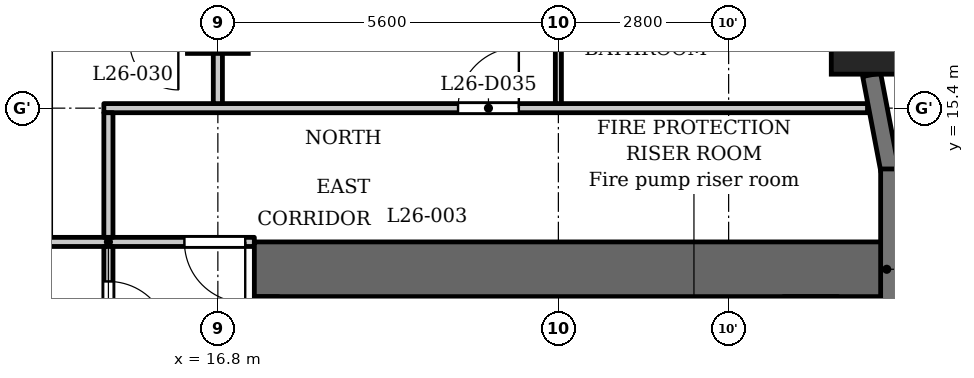
"""IFC4 building model, lengths in metres.
Left out: names, types, materials, properties, quantities, classifications, styles, units other than length and angle.
Written with IfcOpenShell. Run it as: python <this file> out.ifc"""

import sys

from ifc_helpers import new_model, si_unit, direction, frame, frame_2d, origin, origin_2d, place, context, subcontext, project, spatial, rectangle, extrude, element, fill, save


model = new_model("IFC4")
c1 = context("Model", 3, precision=1e-05, world=origin(), true_north=direction((0.0, 1.0)))
c2 = subcontext(c1, "Body", "Model", "MODEL_VIEW")
j1 = project(units=[si_unit("LENGTHUNIT", "METRE"), si_unit("PLANEANGLEUNIT", "RADIAN")], contexts=[c1])
p1 = place(None, origin())
s1 = spatial("IfcSite", under=j1, at=p1, CompositionType="ELEMENT")
p2 = place(p1, origin())
s2 = spatial("IfcBuilding", under=s1, at=p2, CompositionType="ELEMENT")
p3 = place(p2, frame((0.0, 0.0, 104.3)))
s3 = spatial("IfcBuildingStorey", under=s2, at=p3, CompositionType="ELEMENT", Elevation=104.3)
p4 = place(p3, frame((27.538, 16.609, 0.0), z_axis=(0.0, 0.0, 1.0), x_axis=(1.0, 0.0, 0.0)))
e1 = element("IfcColumn", 1, at=p4, inside=s3, PredefinedType="COLUMN", context=c2, shape_type="SweptSolid", body=[
    extrude(rectangle(XDim=1.3, YDim=1.3, at=origin_2d()), origin(), (0.0, 0.0, 1.0), 3.5),
])
p5 = place(p3, frame((16.8, 16.8, 0.0), z_axis=(0.0, 0.0, 1.0), x_axis=(1.0, 0.0, 0.0)))
e2 = element("IfcColumn", 2, at=p5, inside=s3, PredefinedType="COLUMN", context=c2, shape_type="SweptSolid", body=[
    extrude(rectangle(XDim=1.0, YDim=1.0, at=origin_2d()), origin(), (0.0, 0.0, 1.0), 3.5),
])
p6 = place(p3, frame((27.85, 11.85, 0.0), z_axis=(0.0, 0.0, 1.0), x_axis=(0.0, 1.0, 0.0)))
e3 = element("IfcWall", 3, at=p6, inside=s3, PredefinedType="SOLIDWALL", context=c2, shape_type="SweptSolid", body=[
    extrude(rectangle(XDim=2.55, YDim=0.3, at=frame_2d((1.275, 0.0))), origin(), (0.0, 0.0, 1.0), 2.4),
])
p7 = place(p3, frame((27.853, 14.372, 0.0), z_axis=(0.0, 0.0, 1.0), x_axis=(-0.187279751651, 0.982306619453, 0.0)))
e4 = element("IfcWall", 4, at=p7, inside=s3, PredefinedType="SOLIDWALL", context=c2, shape_type="SweptSolid", body=[
    extrude(rectangle(XDim=1.606, YDim=0.3, at=frame_2d((0.803, 0.0))), origin(), (0.0, 0.0, 1.0), 2.4),
])
p8 = place(p3, frame((17.4, 12.75, 0.0), z_axis=(0.0, 0.0, 1.0), x_axis=(1.0, 0.0, 0.0)))
e5 = element("IfcWall", 5, at=p8, inside=s3, PredefinedType="SHEAR", context=c2, shape_type="SweptSolid", body=[
    extrude(rectangle(XDim=10.4, YDim=0.9, at=frame_2d((5.2, 0.0))), origin(), (0.0, 0.0, 1.0), 3.2),
])
p9 = place(p3, frame((17.6, -12.3, 0.0), z_axis=(0.0, 0.0, 1.0), x_axis=(0.0, 1.0, 0.0)))
e6 = element("IfcWall", 6, at=p9, inside=s3, PredefinedType="SHEAR", context=c2, shape_type="SweptSolid", body=[
    extrude(rectangle(XDim=24.6, YDim=0.4, at=frame_2d((12.3, 0.0))), origin(), (0.0, 0.0, 1.0), 3.2),
])
p10 = place(p9, frame((6.0, 0.0, 0.0)))
e7 = element("IfcOpeningElement", 7, at=p10, cuts=e6, PredefinedType="OPENING", context=c2, shape_type="SweptSolid", body=[
    extrude(rectangle(XDim=1.1, YDim=2.1, at=frame_2d((0.55, 1.05))), frame((0.0, 0.21, 0.0), z_axis=(0.0, -1.0, 0.0), x_axis=(1.0, 0.0, 0.0)), (0.0, 0.0, 1.0), 0.42),
])
p11 = place(p9, frame((8.4, 0.0, 0.0)))
e8 = element("IfcOpeningElement", 8, at=p11, cuts=e6, PredefinedType="OPENING", context=c2, shape_type="SweptSolid", body=[
    extrude(rectangle(XDim=1.1, YDim=2.1, at=frame_2d((0.55, 1.05))), frame((0.0, 0.21, 0.0), z_axis=(0.0, -1.0, 0.0), x_axis=(1.0, 0.0, 0.0)), (0.0, 0.0, 1.0), 0.42),
])
p12 = place(p9, frame((10.8, 0.0, 0.0)))
e9 = element("IfcOpeningElement", 9, at=p12, cuts=e6, PredefinedType="OPENING", context=c2, shape_type="SweptSolid", body=[
    extrude(rectangle(XDim=1.1, YDim=2.1, at=frame_2d((0.55, 1.05))), frame((0.0, 0.21, 0.0), z_axis=(0.0, -1.0, 0.0), x_axis=(1.0, 0.0, 0.0)), (0.0, 0.0, 1.0), 0.42),
])
p13 = place(p9, frame((16.75, 0.0, 0.0)))
e10 = element("IfcOpeningElement", 10, at=p13, cuts=e6, PredefinedType="OPENING", context=c2, shape_type="SweptSolid", body=[
    extrude(rectangle(XDim=0.9, YDim=2.1, at=frame_2d((0.45, 1.05))), frame((0.0, 0.21, 0.0), z_axis=(0.0, -1.0, 0.0), x_axis=(1.0, 0.0, 0.0)), (0.0, 0.0, 1.0), 0.42),
])
p14 = place(p9, frame((22.8, 0.0, 0.0)))
e11 = element("IfcOpeningElement", 11, at=p14, cuts=e6, PredefinedType="OPENING", context=c2, shape_type="SweptSolid", body=[
    extrude(rectangle(XDim=1.1, YDim=2.1, at=frame_2d((0.55, 1.05))), frame((0.0, 0.21, 0.0), z_axis=(0.0, -1.0, 0.0), x_axis=(1.0, 0.0, 0.0)), (0.0, 0.0, 1.0), 0.42),
])
p15 = place(p9, frame((0.7, 0.0, 0.0)))
e12 = element("IfcOpeningElement", 12, at=p15, cuts=e6, PredefinedType="OPENING", context=c2, shape_type="SweptSolid", body=[
    extrude(rectangle(XDim=1.1, YDim=2.1, at=frame_2d((0.55, 1.05))), frame((0.0, 0.21, 0.0), z_axis=(0.0, -1.0, 0.0), x_axis=(1.0, 0.0, 0.0)), (0.0, 0.0, 1.0), 0.42),
])
p16 = place(p9, frame((12.775, 0.0, 0.0)))
e13 = element("IfcOpeningElement", 13, at=p16, cuts=e6, PredefinedType="OPENING", context=c2, shape_type="SweptSolid", body=[
    extrude(rectangle(XDim=1.8, YDim=2.1, at=frame_2d((0.9, 1.05))), frame((0.0, 0.21, 0.0), z_axis=(0.0, -1.0, 0.0), x_axis=(1.0, 0.0, 0.0)), (0.0, 0.0, 1.0), 0.42),
])
p17 = place(p3, frame((26.55, -12.3, 0.0), z_axis=(0.0, 0.0, 1.0), x_axis=(0.0, 1.0, 0.0)))
e14 = element("IfcWall", 14, at=p17, inside=s3, PredefinedType="SHEAR", context=c2, shape_type="SweptSolid", body=[
    extrude(rectangle(XDim=24.6, YDim=0.9, at=frame_2d((12.3, 0.0))), origin(), (0.0, 0.0, 1.0), 3.2),
])
p18 = place(p3, frame((23.55, 9.8, 0.0), z_axis=(0.0, 0.0, 1.0), x_axis=(0.0, 1.0, 0.0)))
e15 = element("IfcWall", 15, at=p18, inside=s3, PredefinedType="PARTITIONING", context=c2, shape_type="SweptSolid", body=[
    extrude(rectangle(XDim=2.5, YDim=0.2, at=frame_2d((1.25, 0.0))), origin(), (0.0, 0.0, 1.0), 3.2),
])
p19 = place(p18, frame((0.8, 0.0, 0.0)))
e16 = element("IfcOpeningElement", 16, at=p19, cuts=e15, PredefinedType="OPENING", context=c2, shape_type="SweptSolid", body=[
    extrude(rectangle(XDim=0.9, YDim=2.1, at=frame_2d((0.45, 1.05))), frame((0.0, 0.11, 0.0), z_axis=(0.0, -1.0, 0.0), x_axis=(1.0, 0.0, 0.0)), (0.0, 0.0, 1.0), 0.22),
])
p20 = place(p3, frame((-17.4, 13.2, 0.0), z_axis=(0.0, 0.0, 1.0), x_axis=(1.0, 0.0, 0.0)))
e17 = element("IfcWall", 17, at=p20, inside=s3, PredefinedType="PARTITIONING", context=c2, shape_type="SweptSolid", body=[
    extrude(rectangle(XDim=34.8, YDim=0.15, at=frame_2d((17.4, 0.0))), origin(), (0.0, 0.0, 1.0), 3.2),
])
p21 = place(p20, frame((0.25, 0.0, 0.0)))
e18 = element("IfcOpeningElement", 18, at=p21, cuts=e17, PredefinedType="OPENING", context=c2, shape_type="SweptSolid", body=[
    extrude(rectangle(XDim=1.0, YDim=2.1, at=frame_2d((0.5, 1.05))), frame((0.0, 0.085, 0.0), z_axis=(0.0, -1.0, 0.0), x_axis=(1.0, 0.0, 0.0)), (0.0, 0.0, 1.0), 0.17),
])
p22 = place(p20, frame((33.65, 0.0, 0.0)))
e19 = element("IfcOpeningElement", 19, at=p22, cuts=e17, PredefinedType="OPENING", context=c2, shape_type="SweptSolid", body=[
    extrude(rectangle(XDim=1.0, YDim=2.1, at=frame_2d((0.5, 1.05))), frame((0.0, 0.085, 0.0), z_axis=(0.0, -1.0, 0.0), x_axis=(1.0, 0.0, 0.0)), (0.0, 0.0, 1.0), 0.17),
])
p23 = place(p20, frame((4.55, 0.0, 0.0)))
e20 = element("IfcOpeningElement", 20, at=p23, cuts=e17, PredefinedType="OPENING", context=c2, shape_type="SweptSolid", body=[
    extrude(rectangle(XDim=1.0, YDim=2.1, at=frame_2d((0.5, 1.05))), frame((0.0, 0.085, 0.0), z_axis=(0.0, -1.0, 0.0), x_axis=(1.0, 0.0, 0.0)), (0.0, 0.0, 1.0), 0.17),
])
p24 = place(p20, frame((6.85, 0.0, 0.0)))
e21 = element("IfcOpeningElement", 21, at=p24, cuts=e17, PredefinedType="OPENING", context=c2, shape_type="SweptSolid", body=[
    extrude(rectangle(XDim=1.0, YDim=2.1, at=frame_2d((0.5, 1.05))), frame((0.0, 0.085, 0.0), z_axis=(0.0, -1.0, 0.0), x_axis=(1.0, 0.0, 0.0)), (0.0, 0.0, 1.0), 0.17),
])
p25 = place(p20, frame((12.5, 0.0, 0.0)))
e22 = element("IfcOpeningElement", 22, at=p25, cuts=e17, PredefinedType="OPENING", context=c2, shape_type="SweptSolid", body=[
    extrude(rectangle(XDim=1.0, YDim=2.1, at=frame_2d((0.5, 1.05))), frame((0.0, 0.085, 0.0), z_axis=(0.0, -1.0, 0.0), x_axis=(1.0, 0.0, 0.0)), (0.0, 0.0, 1.0), 0.17),
])
p26 = place(p20, frame((25.7, 0.0, 0.0)))
e23 = element("IfcOpeningElement", 23, at=p26, cuts=e17, PredefinedType="OPENING", context=c2, shape_type="SweptSolid", body=[
    extrude(rectangle(XDim=1.0, YDim=2.1, at=frame_2d((0.5, 1.05))), frame((0.0, 0.085, 0.0), z_axis=(0.0, -1.0, 0.0), x_axis=(1.0, 0.0, 0.0)), (0.0, 0.0, 1.0), 0.17),
])
p27 = place(p20, frame((29.75, 0.0, 0.0)))
e24 = element("IfcOpeningElement", 24, at=p27, cuts=e17, PredefinedType="OPENING", context=c2, shape_type="SweptSolid", body=[
    extrude(rectangle(XDim=1.0, YDim=2.1, at=frame_2d((0.5, 1.05))), frame((0.0, 0.085, 0.0), z_axis=(0.0, -1.0, 0.0), x_axis=(1.0, 0.0, 0.0)), (0.0, 0.0, 1.0), 0.17),
])
p28 = place(p3, frame((14.925, 15.4, 0.0), z_axis=(0.0, 0.0, 1.0), x_axis=(1.0, 0.0, 0.0)))
e25 = element("IfcWall", 25, at=p28, inside=s3, PredefinedType="PARTITIONING", context=c2, shape_type="SweptSolid", body=[
    extrude(rectangle(XDim=12.559, YDim=0.15, at=frame_2d((6.279, 0.0))), origin(), (0.0, 0.0, 1.0), 3.2),
])
p29 = place(p28, frame((5.825, 0.0, 0.0)))
e26 = element("IfcOpeningElement", 26, at=p29, cuts=e25, PredefinedType="OPENING", context=c2, shape_type="SweptSolid", body=[
    extrude(rectangle(XDim=1.0, YDim=2.1, at=frame_2d((0.5, 1.05))), frame((0.0, 0.085, 0.0), z_axis=(0.0, -1.0, 0.0), x_axis=(1.0, 0.0, 0.0)), (0.0, 0.0, 1.0), 0.17),
])
p30 = place(p3, frame((15.0, 6.769, 0.0), z_axis=(0.0, 0.0, 1.0), x_axis=(0.0, 1.0, 0.0)))
e27 = element("IfcWall", 27, at=p30, inside=s3, PredefinedType="PARTITIONING", context=c2, shape_type="SweptSolid", body=[
    extrude(rectangle(XDim=6.356, YDim=0.15, at=frame_2d((3.178, 0.0))), origin(), (0.0, 0.0, 1.0), 3.2),
])
p31 = place(p30, frame((4.781, 0.0, 0.0)))
e28 = element("IfcOpeningElement", 28, at=p31, cuts=e27, PredefinedType="OPENING", context=c2, shape_type="SweptSolid", body=[
    extrude(rectangle(XDim=1.0, YDim=2.1, at=frame_2d((0.5, 1.05))), frame((0.0, 0.085, 0.0), z_axis=(0.0, -1.0, 0.0), x_axis=(1.0, 0.0, 0.0)), (0.0, 0.0, 1.0), 0.17),
])
p32 = place(p3, frame((15.0, 13.275, 0.0), z_axis=(0.0, 0.0, 1.0), x_axis=(0.0, 1.0, 0.0)))
e29 = element("IfcWall", 29, at=p32, inside=s3, PredefinedType="PARTITIONING", context=c2, shape_type="SweptSolid", body=[
    extrude(rectangle(XDim=2.05, YDim=0.15, at=frame_2d((1.025, 0.0))), origin(), (0.0, 0.0, 1.0), 3.2),
])
p33 = place(p3, frame((16.8, 15.475, 0.0), z_axis=(0.0, 0.0, 1.0), x_axis=(0.0, 1.0, 0.0)))
e30 = element("IfcWall", 30, at=p33, inside=s3, PredefinedType="PARTITIONING", context=c2, shape_type="SweptSolid", body=[
    extrude(rectangle(XDim=7.555, YDim=0.15, at=frame_2d((3.777, 0.0))), origin(), (0.0, 0.0, 1.0), 3.2),
])
p34 = place(p3, frame((22.4, 15.475, 0.0), z_axis=(0.0, 0.0, 1.0), x_axis=(0.0, 1.0, 0.0)))
e31 = element("IfcWall", 31, at=p34, inside=s3, PredefinedType="PARTITIONING", context=c2, shape_type="SweptSolid", body=[
    extrude(rectangle(XDim=2.575, YDim=0.1, at=frame_2d((1.288, 0.0))), origin(), (0.0, 0.0, 1.0), 3.2),
])
p35 = place(p31, origin())
e32 = element("IfcDoor", 32, at=p35, inside=s3, OperationType="SINGLE_SWING_LEFT", PredefinedType="DOOR", context=c2, shape_type="SweptSolid", body=[
    extrude(rectangle(XDim=1.0, YDim=2.1, at=frame_2d((0.5, 1.05))), frame((0.0, 0.025, 0.0), z_axis=(0.0, -1.0, 0.0), x_axis=(1.0, 0.0, 0.0)), (0.0, 0.0, 1.0), 0.05),
])
fill(e28, e32)
p36 = place(p22, origin())
e33 = element("IfcDoor", 33, at=p36, inside=s3, OperationType="SINGLE_SWING_RIGHT", PredefinedType="DOOR", context=c2, shape_type="SweptSolid", body=[
    extrude(rectangle(XDim=1.0, YDim=2.1, at=frame_2d((0.5, 1.05))), frame((0.0, 0.025, 0.0), z_axis=(0.0, -1.0, 0.0), x_axis=(1.0, 0.0, 0.0)), (0.0, 0.0, 1.0), 0.05),
])
fill(e19, e33)
p37 = place(p29, origin())
e34 = element("IfcDoor", 34, at=p37, inside=s3, OperationType="SINGLE_SWING_LEFT", PredefinedType="DOOR", context=c2, shape_type="SweptSolid", body=[
    extrude(rectangle(XDim=1.0, YDim=2.1, at=frame_2d((0.5, 1.05))), frame((0.0, 0.025, 0.0), z_axis=(0.0, -1.0, 0.0), x_axis=(1.0, 0.0, 0.0)), (0.0, 0.0, 1.0), 0.05),
])
fill(e26, e34)
save(model, sys.argv[1])
